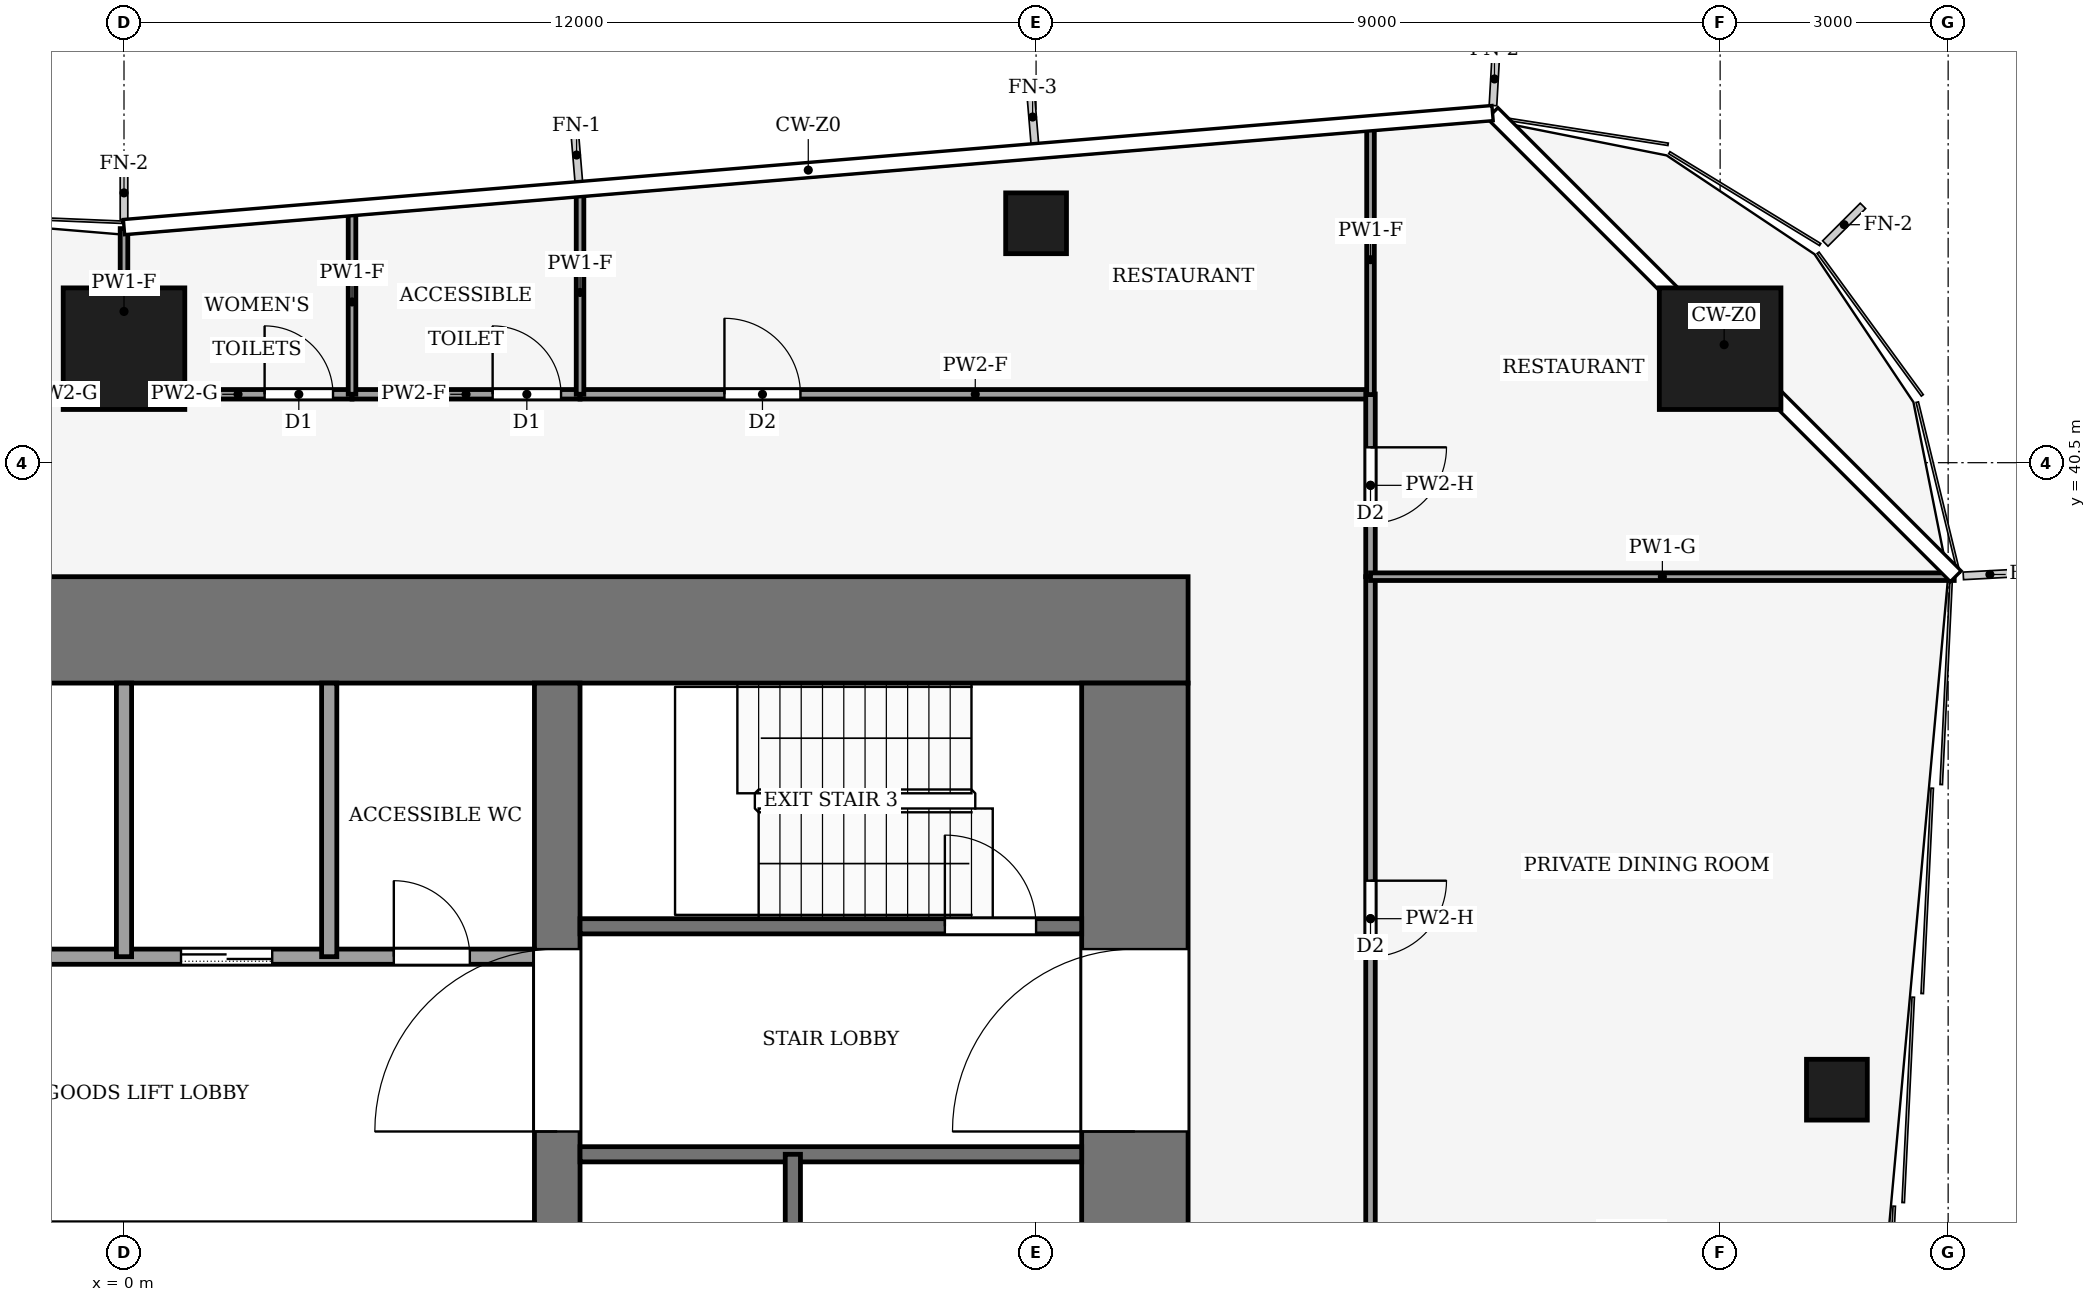
"""IFC4 building model, lengths in metres.
Left out: names, types, materials, properties, quantities, classifications, styles, units other than length and angle.
Written with IfcOpenShell. Run it as: python <this file> out.ifc"""

import sys

from ifc_helpers import new_model, si_unit, direction, frame, frame_2d, origin, origin_2d, place, context, subcontext, project, spatial, rectangle, hollow_rectangle, extrude, element, fill, save


model = new_model("IFC4")
c1 = context("Model", 3, precision=1e-05, world=origin(), true_north=direction((0.0, 1.0)))
c2 = subcontext(c1, "Body", "Model", "MODEL_VIEW")
j1 = project(units=[si_unit("LENGTHUNIT", "METRE"), si_unit("PLANEANGLEUNIT", "RADIAN")], contexts=[c1])
p1 = place(None, origin())
s1 = spatial("IfcSite", under=j1, at=p1, CompositionType="ELEMENT")
p2 = place(p1, origin())
s2 = spatial("IfcBuilding", under=s1, at=p2, CompositionType="ELEMENT")
p3 = place(p2, frame((0.0, 0.0, 14.0)))
s3 = spatial("IfcBuildingStorey", under=s2, at=p3, CompositionType="ELEMENT", Elevation=14.0)
p4 = place(p3, frame((-14.0, 38.3, -0.13), z_axis=(0.0, 0.0, 1.0), x_axis=(1.0, 0.0, 0.0)))
e1 = element("IfcWall", 1, at=p4, inside=s3, PredefinedType="SHEAR", context=c2, shape_type="SweptSolid", body=[
    extrude(rectangle(XDim=28.0, YDim=1.4, at=frame_2d((14.0, 0.0))), origin(), (0.0, 0.0, 1.0), 4.0),
])
p5 = place(p3, frame((13.3, 18.4, -0.13), z_axis=(0.0, 0.0, 1.0), x_axis=(0.0, 1.0, 0.0)))
e2 = element("IfcWall", 2, at=p5, inside=s3, PredefinedType="SHEAR", context=c2, shape_type="SweptSolid", body=[
    extrude(rectangle(XDim=19.2, YDim=1.4, at=frame_2d((9.6, 0.0))), origin(), (0.0, 0.0, 1.0), 4.0),
])
p6 = place(p5, frame((2.8, 0.0, 0.13)))
e3 = element("IfcOpeningElement", 3, at=p6, cuts=e2, PredefinedType="OPENING", context=c2, shape_type="SweptSolid", body=[
    extrude(rectangle(XDim=2.4, YDim=2.4, at=frame_2d((1.2, 1.2))), frame((0.0, 0.71, 0.0), z_axis=(0.0, -1.0, 0.0), x_axis=(1.0, 0.0, 0.0)), (0.0, 0.0, 1.0), 1.42),
])
p7 = place(p5, frame((13.3, 0.0, 0.13)))
e4 = element("IfcOpeningElement", 4, at=p7, cuts=e2, PredefinedType="OPENING", context=c2, shape_type="SweptSolid", body=[
    extrude(rectangle(XDim=2.4, YDim=2.4, at=frame_2d((1.2, 1.2))), frame((0.0, 0.71, 0.0), z_axis=(0.0, -1.0, 0.0), x_axis=(1.0, 0.0, 0.0)), (0.0, 0.0, 1.0), 1.42),
])
p8 = place(p3, frame((5.7, 18.4, -0.13), z_axis=(0.0, 0.0, 1.0), x_axis=(0.0, 1.0, 0.0)))
e5 = element("IfcWall", 5, at=p8, inside=s3, PredefinedType="SHEAR", context=c2, shape_type="SweptSolid", body=[
    extrude(rectangle(XDim=19.2, YDim=0.6, at=frame_2d((9.6, 0.0))), origin(), (0.0, 0.0, 1.0), 4.0),
])
p9 = place(p8, frame((13.3, 0.0, 0.13)))
e6 = element("IfcOpeningElement", 6, at=p9, cuts=e5, PredefinedType="OPENING", context=c2, shape_type="SweptSolid", body=[
    extrude(rectangle(XDim=2.4, YDim=2.4, at=frame_2d((1.2, 1.2))), frame((0.0, 0.31, 0.0), z_axis=(0.0, -1.0, 0.0), x_axis=(1.0, 0.0, 0.0)), (0.0, 0.0, 1.0), 0.62),
])
for number, where, z_axis, x_axis in (
    (7, (0.0, 42.0, 0.0), (0.0, 0.0, 1.0), (1.0, 0.0, 0.0)),
    (8, (21.0, 42.0, 0.0), (0.0, 0.0, 1.0), (1.0, 0.0, 0.0)),
):
    element("IfcColumn", number, at=place(p3, frame(where, z_axis=z_axis, x_axis=x_axis)), inside=s3, PredefinedType="COLUMN", context=c2, shape_type="SweptSolid", body=[
        extrude(hollow_rectangle(XDim=1.6, YDim=1.6, WallThickness=0.09, at=origin_2d()), origin(), (0.0, 0.0, 1.0), 4.0),
    ])
for number, where, z_axis, x_axis in (
    (9, (12.0, 43.65, 0.0), (0.0, 0.0, 1.0), (1.0, 0.0, 0.0)),
    (10, (22.536, 32.25, 0.0), (0.0, 0.0, 1.0), (1.0, 0.0, 0.0)),
):
    element("IfcColumn", number, at=place(p3, frame(where, z_axis=z_axis, x_axis=x_axis)), inside=s3, PredefinedType="COLUMN", context=c2, shape_type="SweptSolid", body=[
        extrude(hollow_rectangle(XDim=0.8, YDim=0.8, WallThickness=0.04, at=origin_2d()), origin(), (0.0, 0.0, 1.0), 4.0),
    ])
p10 = place(p3, frame((6.0, 31.4, 0.0), z_axis=(0.0, 0.0, 1.0), x_axis=(1.0, 0.0, 0.0)))
e11 = element("IfcWall", 11, at=p10, inside=s3, PredefinedType="PARTITIONING", context=c2, shape_type="SweptSolid", body=[
    extrude(rectangle(XDim=6.6, YDim=0.2, at=frame_2d((3.3, 0.0))), origin(), (0.0, 0.0, 1.0), 3.87),
])
p11 = place(p3, frame((-5.4, 34.0, 0.0), z_axis=(0.0, 0.0, 1.0), x_axis=(1.0, 0.0, 0.0)))
e12 = element("IfcWall", 12, at=p11, inside=s3, PredefinedType="PARTITIONING", context=c2, shape_type="SweptSolid", body=[
    extrude(rectangle(XDim=10.8, YDim=0.2, at=frame_2d((5.4, 0.0))), origin(), (0.0, 0.0, 1.0), 3.87),
])
p12 = place(p11, frame((6.15, 0.0, 0.0)))
e13 = element("IfcOpeningElement", 13, at=p12, cuts=e12, PredefinedType="OPENING", context=c2, shape_type="SweptSolid", body=[
    extrude(rectangle(XDim=1.2, YDim=2.2, at=frame_2d((0.6, 1.1))), frame((0.0, 0.11, 0.0), z_axis=(0.0, -1.0, 0.0), x_axis=(1.0, 0.0, 0.0)), (0.0, 0.0, 1.0), 0.22),
])
p13 = place(p11, frame((8.95, 0.0, 0.0)))
e14 = element("IfcOpeningElement", 14, at=p13, cuts=e12, PredefinedType="OPENING", context=c2, shape_type="SweptSolid", body=[
    extrude(rectangle(XDim=1.0, YDim=2.1, at=frame_2d((0.5, 1.05))), frame((0.0, 0.11, 0.0), z_axis=(0.0, -1.0, 0.0), x_axis=(1.0, 0.0, 0.0)), (0.0, 0.0, 1.0), 0.22),
])
p14 = place(p3, frame((6.0, 34.4, 0.0), z_axis=(0.0, 0.0, 1.0), x_axis=(1.0, 0.0, 0.0)))
e15 = element("IfcWall", 15, at=p14, inside=s3, PredefinedType="PARTITIONING", context=c2, shape_type="SweptSolid", body=[
    extrude(rectangle(XDim=6.6, YDim=0.2, at=frame_2d((3.3, 0.0))), origin(), (0.0, 0.0, 1.0), 3.87),
])
p15 = place(p14, frame((4.8, 0.0, 0.0)))
e16 = element("IfcOpeningElement", 16, at=p15, cuts=e15, PredefinedType="OPENING", context=c2, shape_type="SweptSolid", body=[
    extrude(rectangle(XDim=1.2, YDim=2.2, at=frame_2d((0.6, 1.1))), frame((0.0, 0.11, 0.0), z_axis=(0.0, -1.0, 0.0), x_axis=(1.0, 0.0, 0.0)), (0.0, 0.0, 1.0), 0.22),
])
for number, where, z_axis, x_axis in (
    (17, (0.0, 34.0, 0.0), (0.0, 0.0, 1.0), (0.0, 1.0, 0.0)),
    (18, (2.7, 34.0, 0.0), (0.0, 0.0, 1.0), (0.0, 1.0, 0.0)),
):
    element("IfcWall", number, at=place(p3, frame(where, z_axis=z_axis, x_axis=x_axis)), inside=s3, PredefinedType="PARTITIONING", context=c2, shape_type="SweptSolid", body=[
        extrude(rectangle(XDim=3.6, YDim=0.2, at=frame_2d((1.8, 0.0))), origin(), (0.0, 0.0, 1.0), 3.87),
    ])
p16 = place(p3, frame((8.8, 24.0, 0.0), z_axis=(0.0, 0.0, 1.0), x_axis=(0.0, 1.0, 0.0)))
e19 = element("IfcWall", 19, at=p16, inside=s3, PredefinedType="PARTITIONING", context=c2, shape_type="SweptSolid", body=[
    extrude(rectangle(XDim=7.4, YDim=0.2, at=frame_2d((3.7, 0.0))), origin(), (0.0, 0.0, 1.0), 3.87),
])
p17 = place(p3, frame((-3.0, 41.4, 0.0), z_axis=(0.0, 0.0, 1.0), x_axis=(1.0, 0.0, 0.0)))
e20 = element("IfcWall", 20, at=p17, inside=s3, PredefinedType="PARTITIONING", context=c2, shape_type="SweptSolid", body=[
    extrude(rectangle(XDim=3.0, YDim=0.125, at=frame_2d((1.5, 0.0))), origin(), (0.0, 0.0, 1.0), 3.87),
])
p18 = place(p17, frame((0.25, 0.0, 0.0)))
e21 = element("IfcOpeningElement", 21, at=p18, cuts=e20, PredefinedType="OPENING", context=c2, shape_type="SweptSolid", body=[
    extrude(rectangle(XDim=0.9, YDim=2.1, at=frame_2d((0.45, 1.05))), frame((0.0, 0.073, 0.0), z_axis=(0.0, -1.0, 0.0), x_axis=(1.0, 0.0, 0.0)), (0.0, 0.0, 1.0), 0.145),
])
p19 = place(p3, frame((0.0, 41.4, 0.0), z_axis=(0.0, 0.0, 1.0), x_axis=(1.0, 0.0, 0.0)))
e22 = element("IfcWall", 22, at=p19, inside=s3, PredefinedType="PARTITIONING", context=c2, shape_type="SweptSolid", body=[
    extrude(rectangle(XDim=3.0, YDim=0.125, at=frame_2d((1.5, 0.0))), origin(), (0.0, 0.0, 1.0), 3.87),
])
p20 = place(p19, frame((1.85, 0.0, 0.0)))
e23 = element("IfcOpeningElement", 23, at=p20, cuts=e22, PredefinedType="OPENING", context=c2, shape_type="SweptSolid", body=[
    extrude(rectangle(XDim=0.9, YDim=2.1, at=frame_2d((0.45, 1.05))), frame((0.0, 0.073, 0.0), z_axis=(0.0, -1.0, 0.0), x_axis=(1.0, 0.0, 0.0)), (0.0, 0.0, 1.0), 0.145),
])
p21 = place(p3, frame((3.0, 41.4, 0.0), z_axis=(0.0, 0.0, 1.0), x_axis=(1.0, 0.0, 0.0)))
e24 = element("IfcWall", 24, at=p21, inside=s3, PredefinedType="PARTITIONING", context=c2, shape_type="SweptSolid", body=[
    extrude(rectangle(XDim=3.0, YDim=0.125, at=frame_2d((1.5, 0.0))), origin(), (0.0, 0.0, 1.0), 3.54),
])
p22 = place(p21, frame((1.85, 0.0, 0.0)))
e25 = element("IfcOpeningElement", 25, at=p22, cuts=e24, PredefinedType="OPENING", context=c2, shape_type="SweptSolid", body=[
    extrude(rectangle(XDim=0.9, YDim=2.1, at=frame_2d((0.45, 1.05))), frame((0.0, 0.073, 0.0), z_axis=(0.0, -1.0, 0.0), x_axis=(1.0, 0.0, 0.0)), (0.0, 0.0, 1.0), 0.145),
])
p23 = place(p3, frame((6.0, 41.4, 0.0), z_axis=(0.0, 0.0, 1.0), x_axis=(1.0, 0.0, 0.0)))
e26 = element("IfcWall", 26, at=p23, inside=s3, PredefinedType="PARTITIONING", context=c2, shape_type="SweptSolid", body=[
    extrude(rectangle(XDim=10.4, YDim=0.125, at=frame_2d((5.2, 0.0))), origin(), (0.0, 0.0, 1.0), 3.54),
])
p24 = place(p23, frame((1.9, 0.0, 0.0)))
e27 = element("IfcOpeningElement", 27, at=p24, cuts=e26, PredefinedType="OPENING", context=c2, shape_type="SweptSolid", body=[
    extrude(rectangle(XDim=1.0, YDim=2.1, at=frame_2d((0.5, 1.05))), frame((0.0, 0.073, 0.0), z_axis=(0.0, -1.0, 0.0), x_axis=(1.0, 0.0, 0.0)), (0.0, 0.0, 1.0), 0.145),
])
p25 = place(p3, frame((16.4, 39.0, 0.0), z_axis=(0.0, 0.0, 1.0), x_axis=(0.0, -1.0, 0.0)))
e28 = element("IfcWall", 28, at=p25, inside=s3, PredefinedType="PARTITIONING", context=c2, shape_type="SweptSolid", body=[
    extrude(rectangle(XDim=9.0, YDim=0.125, at=frame_2d((4.5, 0.0))), origin(), (0.0, 0.0, 1.0), 3.14),
])
p26 = place(p25, frame((4.0, 0.0, 0.0)))
e29 = element("IfcOpeningElement", 29, at=p26, cuts=e28, PredefinedType="OPENING", context=c2, shape_type="SweptSolid", body=[
    extrude(rectangle(XDim=1.0, YDim=2.1, at=frame_2d((0.5, 1.05))), frame((0.0, 0.073, 0.0), z_axis=(0.0, -1.0, 0.0), x_axis=(1.0, 0.0, 0.0)), (0.0, 0.0, 1.0), 0.145),
])
p27 = place(p3, frame((16.4, 41.404, 0.0), z_axis=(0.0, 0.0, 1.0), x_axis=(0.0, -1.0, 0.0)))
e30 = element("IfcWall", 30, at=p27, inside=s3, PredefinedType="PARTITIONING", context=c2, shape_type="SweptSolid", body=[
    extrude(rectangle(XDim=2.404, YDim=0.125, at=frame_2d((1.202, 0.0))), origin(), (0.0, 0.0, 1.0), 3.14),
])
p28 = place(p27, frame((0.702, 0.0, 0.0)))
e31 = element("IfcOpeningElement", 31, at=p28, cuts=e30, PredefinedType="OPENING", context=c2, shape_type="SweptSolid", body=[
    extrude(rectangle(XDim=1.0, YDim=2.1, at=frame_2d((0.5, 1.05))), frame((0.0, 0.073, 0.0), z_axis=(0.0, -1.0, 0.0), x_axis=(1.0, 0.0, 0.0)), (0.0, 0.0, 1.0), 0.145),
])
p29 = place(p3, frame((0.0, 41.4, 0.0), z_axis=(0.0, 0.0, 1.0), x_axis=(0.0, 1.0, 0.0)))
e32 = element("IfcWall", 32, at=p29, inside=s3, PredefinedType="PARTITIONING", context=c2, shape_type="SweptSolid", body=[
    extrude(rectangle(XDim=2.18, YDim=0.1, at=frame_2d((1.09, 0.0))), origin(), (0.0, 0.0, 1.0), 3.04),
])
p30 = place(p3, frame((3.0, 41.4, 0.0), z_axis=(0.0, 0.0, 1.0), x_axis=(0.0, 1.0, 0.0)))
e33 = element("IfcWall", 33, at=p30, inside=s3, PredefinedType="PARTITIONING", context=c2, shape_type="SweptSolid", body=[
    extrude(rectangle(XDim=2.43, YDim=0.1, at=frame_2d((1.215, 0.0))), origin(), (0.0, 0.0, 1.0), 3.04),
])
p31 = place(p3, frame((6.0, 41.4, 0.0), z_axis=(0.0, 0.0, 1.0), x_axis=(0.0, 1.0, 0.0)))
e34 = element("IfcWall", 34, at=p31, inside=s3, PredefinedType="PARTITIONING", context=c2, shape_type="SweptSolid", body=[
    extrude(rectangle(XDim=2.68, YDim=0.1, at=frame_2d((1.34, 0.0))), origin(), (0.0, 0.0, 1.0), 3.04),
])
p32 = place(p3, frame((16.4, 41.396, 0.0), z_axis=(0.0, 0.0, 1.0), x_axis=(0.0, 1.0, 0.0)))
e35 = element("IfcWall", 35, at=p32, inside=s3, PredefinedType="PARTITIONING", context=c2, shape_type="SweptSolid", body=[
    extrude(rectangle(XDim=3.551, YDim=0.1, at=frame_2d((1.775, 0.0))), origin(), (0.0, 0.0, 1.0), 3.04),
])
p33 = place(p3, frame((24.08, 39.0, 0.0), z_axis=(0.0, 0.0, 1.0), x_axis=(-1.0, 0.0, 0.0)))
e36 = element("IfcWall", 36, at=p33, inside=s3, PredefinedType="PARTITIONING", context=c2, shape_type="SweptSolid", body=[
    extrude(rectangle(XDim=7.68, YDim=0.1, at=frame_2d((3.84, 0.0))), origin(), (0.0, 0.0, 1.0), 2.93),
])
p34 = place(p12, origin())
e37 = element("IfcDoor", 37, at=p34, inside=s3, OperationType="SLIDING_TO_LEFT", PredefinedType="DOOR", context=c2, shape_type="SweptSolid", body=[
    extrude(rectangle(XDim=1.2, YDim=2.2, at=frame_2d((0.6, 1.1))), frame((0.0, 0.025, 0.0), z_axis=(0.0, -1.0, 0.0), x_axis=(1.0, 0.0, 0.0)), (0.0, 0.0, 1.0), 0.05),
])
fill(e13, e37)
p35 = place(p13, origin())
e38 = element("IfcDoor", 38, at=p35, inside=s3, OperationType="SINGLE_SWING_LEFT", PredefinedType="DOOR", context=c2, shape_type="SweptSolid", body=[
    extrude(rectangle(XDim=1.0, YDim=2.1, at=frame_2d((0.5, 1.05))), frame((0.0, 0.025, 0.0), z_axis=(0.0, -1.0, 0.0), x_axis=(1.0, 0.0, 0.0)), (0.0, 0.0, 1.0), 0.05),
])
fill(e14, e38)
p36 = place(p15, origin())
e39 = element("IfcDoor", 39, at=p36, inside=s3, OperationType="SINGLE_SWING_RIGHT", PredefinedType="DOOR", context=c2, shape_type="SweptSolid", body=[
    extrude(rectangle(XDim=1.2, YDim=2.2, at=frame_2d((0.6, 1.1))), frame((0.0, 0.025, 0.0), z_axis=(0.0, -1.0, 0.0), x_axis=(1.0, 0.0, 0.0)), (0.0, 0.0, 1.0), 0.05),
])
fill(e16, e39)
p37 = place(p9, origin())
e40 = element("IfcDoor", 40, at=p37, inside=s3, OperationType="DOUBLE_DOOR_SINGLE_SWING", PredefinedType="DOOR", context=c2, shape_type="SweptSolid", body=[
    extrude(rectangle(XDim=2.4, YDim=2.4, at=frame_2d((1.2, 1.2))), frame((0.0, 0.025, 0.0), z_axis=(0.0, -1.0, 0.0), x_axis=(1.0, 0.0, 0.0)), (0.0, 0.0, 1.0), 0.05),
])
fill(e6, e40)
p38 = place(p7, origin())
e41 = element("IfcDoor", 41, at=p38, inside=s3, OperationType="DOUBLE_DOOR_SINGLE_SWING", PredefinedType="DOOR", context=c2, shape_type="SweptSolid", body=[
    extrude(rectangle(XDim=2.4, YDim=2.4, at=frame_2d((1.2, 1.2))), frame((0.0, 0.025, 0.0), z_axis=(0.0, -1.0, 0.0), x_axis=(1.0, 0.0, 0.0)), (0.0, 0.0, 1.0), 0.05),
])
fill(e4, e41)
p39 = place(p20, origin())
e42 = element("IfcDoor", 42, at=p39, inside=s3, OperationType="SINGLE_SWING_RIGHT", PredefinedType="DOOR", context=c2, shape_type="SweptSolid", body=[
    extrude(rectangle(XDim=0.9, YDim=2.1, at=frame_2d((0.45, 1.05))), frame((0.0, 0.025, 0.0), z_axis=(0.0, -1.0, 0.0), x_axis=(1.0, 0.0, 0.0)), (0.0, 0.0, 1.0), 0.05),
])
fill(e23, e42)
p40 = place(p22, origin())
e43 = element("IfcDoor", 43, at=p40, inside=s3, OperationType="SINGLE_SWING_RIGHT", PredefinedType="DOOR", context=c2, shape_type="SweptSolid", body=[
    extrude(rectangle(XDim=0.9, YDim=2.1, at=frame_2d((0.45, 1.05))), frame((0.0, 0.025, 0.0), z_axis=(0.0, -1.0, 0.0), x_axis=(1.0, 0.0, 0.0)), (0.0, 0.0, 1.0), 0.05),
])
fill(e25, e43)
p41 = place(p24, origin())
e44 = element("IfcDoor", 44, at=p41, inside=s3, OperationType="SINGLE_SWING_LEFT", PredefinedType="DOOR", context=c2, shape_type="SweptSolid", body=[
    extrude(rectangle(XDim=1.0, YDim=2.1, at=frame_2d((0.5, 1.05))), frame((0.0, 0.025, 0.0), z_axis=(0.0, -1.0, 0.0), x_axis=(1.0, 0.0, 0.0)), (0.0, 0.0, 1.0), 0.05),
])
fill(e27, e44)
p42 = place(p26, origin())
e45 = element("IfcDoor", 45, at=p42, inside=s3, OperationType="SINGLE_SWING_LEFT", PredefinedType="DOOR", context=c2, shape_type="SweptSolid", body=[
    extrude(rectangle(XDim=1.0, YDim=2.1, at=frame_2d((0.5, 1.05))), frame((0.0, 0.025, 0.0), z_axis=(0.0, -1.0, 0.0), x_axis=(1.0, 0.0, 0.0)), (0.0, 0.0, 1.0), 0.05),
])
fill(e29, e45)
p43 = place(p28, origin())
e46 = element("IfcDoor", 46, at=p43, inside=s3, OperationType="SINGLE_SWING_RIGHT", PredefinedType="DOOR", context=c2, shape_type="SweptSolid", body=[
    extrude(rectangle(XDim=1.0, YDim=2.1, at=frame_2d((0.5, 1.05))), frame((0.0, 0.025, 0.0), z_axis=(0.0, -1.0, 0.0), x_axis=(1.0, 0.0, 0.0)), (0.0, 0.0, 1.0), 0.05),
])
fill(e31, e46)
save(model, sys.argv[1])
